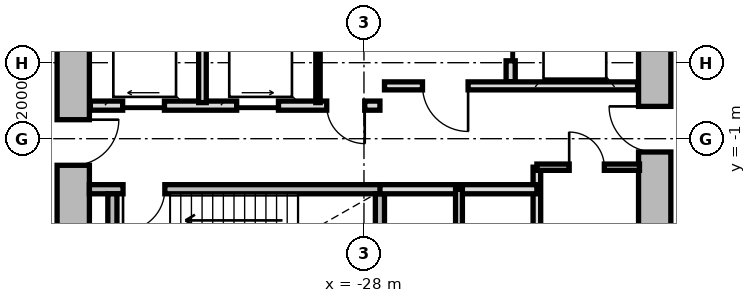
"""IFC4 building model, lengths in metres.
Left out: names, types, materials, properties, quantities, classifications, styles, units other than length and angle.
Written with IfcOpenShell. Run it as: python <this file> out.ifc"""

import sys

from ifc_helpers import new_model, si_unit, direction, frame, frame_2d, origin, place, context, subcontext, project, spatial, rectangle, extrude, source, transform, mapped, element, fill, save


model = new_model("IFC4")
c1 = context("Model", 3, precision=1e-05, world=origin(), true_north=direction((0.0, 1.0)))
c2 = subcontext(c1, "Body", "Model", "MODEL_VIEW")
j1 = project(units=[si_unit("LENGTHUNIT", "METRE"), si_unit("PLANEANGLEUNIT", "RADIAN")], contexts=[c1])
p1 = place(None, origin())
s1 = spatial("IfcSite", under=j1, at=p1, CompositionType="ELEMENT")
p2 = place(p1, origin())
s2 = spatial("IfcBuilding", under=s1, at=p2, CompositionType="ELEMENT")
p3 = place(p2, frame((0.0, 0.0, 73.45)))
s3 = spatial("IfcBuildingStorey", under=s2, at=p3, CompositionType="ELEMENT", Elevation=73.45)
m1 = source(origin(), c2, "Body", "SweptSolid", [
    extrude(rectangle(XDim=11.0, YDim=0.85, at=frame_2d((5.5, 0.0))), origin(), (0.0, 0.0, 1.0), 4.08),
])
p4 = place(p3, frame((-35.65, -5.5, 0.0), z_axis=(0.0, 0.0, 1.0), x_axis=(0.0, 1.0, 0.0)))
e1 = element("IfcWall", 1, at=p4, inside=s3, PredefinedType="SHEAR", context=c2, shape_type="MappedRepresentation", body=[
    mapped(m1, transform((0.0, 0.0, 0.0), x_axis=(1.0, 0.0, 0.0), y_axis=(0.0, 1.0, 0.0), z_axis=(0.0, 0.0, 1.0), scale=1.0)),
])
p5 = place(p4, frame((3.8, 0.0, 0.0)))
e2 = element("IfcOpeningElement", 2, at=p5, cuts=e1, PredefinedType="OPENING", context=c2, shape_type="SweptSolid", body=[
    extrude(rectangle(XDim=1.2, YDim=2.15, at=frame_2d((0.6, 1.075))), frame((0.0, 0.435, 0.0), z_axis=(0.0, -1.0, 0.0), x_axis=(1.0, 0.0, 0.0)), (0.0, 0.0, 1.0), 0.87),
])
p6 = place(p3, frame((-20.35, 5.5, 0.0), z_axis=(0.0, 0.0, 1.0), x_axis=(0.0, -1.0, 0.0)))
e3 = element("IfcWall", 3, at=p6, inside=s3, PredefinedType="SHEAR", context=c2, shape_type="MappedRepresentation", body=[
    mapped(m1, transform((0.0, 0.0, 0.0), x_axis=(1.0, 0.0, 0.0), y_axis=(0.0, 1.0, 0.0), z_axis=(0.0, 0.0, 1.0), scale=1.0)),
])
p7 = place(p6, frame((5.65, 0.0, 0.0)))
e4 = element("IfcOpeningElement", 4, at=p7, cuts=e3, PredefinedType="OPENING", context=c2, shape_type="SweptSolid", body=[
    extrude(rectangle(XDim=1.2, YDim=2.15, at=frame_2d((0.6, 1.075))), frame((0.0, 0.435, 0.0), z_axis=(0.0, -1.0, 0.0), x_axis=(1.0, 0.0, 0.0)), (0.0, 0.0, 1.0), 0.87),
])
p8 = place(p6, frame((9.3, 0.0, 0.0)))
e5 = element("IfcOpeningElement", 5, at=p8, cuts=e3, PredefinedType="OPENING", context=c2, shape_type="SweptSolid", body=[
    extrude(rectangle(XDim=1.0, YDim=2.1, at=frame_2d((0.5, 1.05))), frame((0.0, 0.435, 0.0), z_axis=(0.0, -1.0, 0.0), x_axis=(1.0, 0.0, 0.0)), (0.0, 0.0, 1.0), 0.87),
])
m2 = source(origin(), c2, "Body", "SweptSolid", [
    extrude(rectangle(XDim=7.765, YDim=0.24, at=frame_2d((3.883, 0.0))), origin(), (0.0, 0.0, 1.0), 4.08),
])
p9 = place(p3, frame((-35.225, -2.33, 0.0), z_axis=(0.0, 0.0, 1.0), x_axis=(1.0, 0.0, 0.0)))
e6 = element("IfcWall", 6, at=p9, inside=s3, PredefinedType="PARTITIONING", context=c2, shape_type="MappedRepresentation", body=[
    mapped(m2, transform((0.0, 0.0, 0.0), x_axis=(1.0, 0.0, 0.0), y_axis=(0.0, 1.0, 0.0), z_axis=(0.0, 0.0, 1.0), scale=1.0)),
])
p10 = place(p9, frame((0.885, 0.0, 0.0)))
e7 = element("IfcOpeningElement", 7, at=p10, cuts=e6, PredefinedType="OPENING", context=c2, shape_type="SweptSolid", body=[
    extrude(rectangle(XDim=1.1, YDim=2.15, at=frame_2d((0.55, 1.075))), frame((0.0, 0.13, 0.0), z_axis=(0.0, -1.0, 0.0), x_axis=(1.0, 0.0, 0.0)), (0.0, 0.0, 1.0), 0.26),
])
m3 = source(origin(), c2, "Body", "SweptSolid", [
    extrude(rectangle(XDim=3.075, YDim=0.24, at=frame_2d((1.538, 0.0))), origin(), (0.0, 0.0, 1.0), 4.08),
])
for number, where, z_axis, x_axis in (
    (8, (-34.62, -5.525, 0.0), (0.0, 0.0, 1.0), (0.0, 1.0, 0.0)),
    (9, (-27.58, -5.525, 0.0), (0.0, 0.0, 1.0), (0.0, 1.0, 0.0)),
):
    element("IfcWall", number, at=place(p3, frame(where, z_axis=z_axis, x_axis=x_axis)), inside=s3, PredefinedType="PARTITIONING", context=c2, shape_type="MappedRepresentation", body=[
        mapped(m3, transform((0.0, 0.0, 0.0), x_axis=(1.0, 0.0, 0.0), y_axis=(0.0, 1.0, 0.0), z_axis=(0.0, 0.0, 1.0), scale=1.0)),
    ])
m4 = source(origin(), c2, "Body", "SweptSolid", [
    extrude(rectangle(XDim=5.0, YDim=0.24, at=frame_2d((2.5, 0.0))), origin(), (0.0, 0.0, 1.0), 4.065),
])
p11 = place(p3, frame((-24.14, 0.5, 0.0), z_axis=(0.0, 0.0, 1.0), x_axis=(0.0, 1.0, 0.0)))
e10 = element("IfcWall", 10, at=p11, inside=s3, PredefinedType="PARTITIONING", context=c2, shape_type="MappedRepresentation", body=[
    mapped(m4, transform((0.0, 0.0, 0.0), x_axis=(1.0, 0.0, 0.0), y_axis=(0.0, 1.0, 0.0), z_axis=(0.0, 0.0, 1.0), scale=1.0)),
])
p12 = place(p11, frame((3.05, 0.0, 0.0)))
e11 = element("IfcOpeningElement", 11, at=p12, cuts=e10, PredefinedType="OPENING", context=c2, shape_type="SweptSolid", body=[
    extrude(rectangle(XDim=1.3, YDim=2.2, at=frame_2d((0.65, 1.1))), frame((0.0, 0.13, 0.0), z_axis=(0.0, -1.0, 0.0), x_axis=(1.0, 0.0, 0.0)), (0.0, 0.0, 1.0), 0.26),
])
p13 = place(p11, frame((0.55, 0.0, 0.0)))
e12 = element("IfcOpeningElement", 12, at=p13, cuts=e10, PredefinedType="OPENING", context=c2, shape_type="SweptSolid", body=[
    extrude(rectangle(XDim=1.3, YDim=2.2, at=frame_2d((0.65, 1.1))), frame((0.0, 0.13, 0.0), z_axis=(0.0, -1.0, 0.0), x_axis=(1.0, 0.0, 0.0)), (0.0, 0.0, 1.0), 0.26),
])
m5 = source(origin(), c2, "Body", "SweptSolid", [
    extrude(rectangle(XDim=6.66, YDim=0.21, at=frame_2d((3.33, 0.0))), origin(), (0.0, 0.0, 1.0), 4.065),
])
p14 = place(p3, frame((-27.46, 0.39, 0.0), z_axis=(0.0, 0.0, 1.0), x_axis=(1.0, 0.0, 0.0)))
e13 = element("IfcWall", 13, at=p14, inside=s3, PredefinedType="PARTITIONING", context=c2, shape_type="MappedRepresentation", body=[
    mapped(m5, transform((0.0, 0.0, 0.0), x_axis=(1.0, 0.0, 0.0), y_axis=(0.0, 1.0, 0.0), z_axis=(0.0, 0.0, 1.0), scale=1.0)),
])
p15 = place(p14, frame((1.0, 0.0, 0.0)))
e14 = element("IfcOpeningElement", 14, at=p15, cuts=e13, PredefinedType="OPENING", context=c2, shape_type="SweptSolid", body=[
    extrude(rectangle(XDim=1.2, YDim=2.15, at=frame_2d((0.6, 1.075))), frame((0.0, 0.115, 0.0), z_axis=(0.0, -1.0, 0.0), x_axis=(1.0, 0.0, 0.0)), (0.0, 0.0, 1.0), 0.23),
])
m6 = source(origin(), c2, "Body", "SweptSolid", [
    extrude(rectangle(XDim=7.62, YDim=0.24, at=frame_2d((3.81, 0.0))), origin(), (0.0, 0.0, 1.0), 4.065),
])
p16 = place(p3, frame((-35.2, -0.13, 0.0), z_axis=(0.0, 0.0, 1.0), x_axis=(1.0, 0.0, 0.0)))
e15 = element("IfcWall", 15, at=p16, inside=s3, PredefinedType="PARTITIONING", context=c2, shape_type="MappedRepresentation", body=[
    mapped(m6, transform((0.0, 0.0, 0.0), x_axis=(1.0, 0.0, 0.0), y_axis=(0.0, 1.0, 0.0), z_axis=(0.0, 0.0, 1.0), scale=1.0)),
])
p17 = place(p16, frame((6.22, 0.0, 0.0)))
e16 = element("IfcOpeningElement", 16, at=p17, cuts=e15, PredefinedType="OPENING", context=c2, shape_type="SweptSolid", body=[
    extrude(rectangle(XDim=1.0, YDim=2.1, at=frame_2d((0.5, 1.05))), frame((0.0, 0.13, 0.0), z_axis=(0.0, -1.0, 0.0), x_axis=(1.0, 0.0, 0.0)), (0.0, 0.0, 1.0), 0.26),
])
p18 = place(p16, frame((0.85, 0.0, 0.0)))
e17 = element("IfcOpeningElement", 17, at=p18, cuts=e15, PredefinedType="OPENING", context=c2, shape_type="SweptSolid", body=[
    extrude(rectangle(XDim=1.1, YDim=2.2, at=frame_2d((0.55, 1.1))), frame((0.0, 0.13, 0.0), z_axis=(0.0, -1.0, 0.0), x_axis=(1.0, 0.0, 0.0)), (0.0, 0.0, 1.0), 0.26),
])
p19 = place(p16, frame((3.85, 0.0, 0.0)))
e18 = element("IfcOpeningElement", 18, at=p19, cuts=e15, PredefinedType="OPENING", context=c2, shape_type="SweptSolid", body=[
    extrude(rectangle(XDim=1.1, YDim=2.2, at=frame_2d((0.55, 1.1))), frame((0.0, 0.13, 0.0), z_axis=(0.0, -1.0, 0.0), x_axis=(1.0, 0.0, 0.0)), (0.0, 0.0, 1.0), 0.26),
])
m7 = source(origin(), c2, "Body", "SweptSolid", [
    extrude(rectangle(XDim=2.33, YDim=0.115, at=frame_2d((1.165, 0.0))), origin(), (0.0, 0.0, 1.0), 4.065),
])
p20 = place(p3, frame((-29.21, -0.05, 0.0), z_axis=(0.0, 0.0, 1.0), x_axis=(0.0, 1.0, 0.0)))
e19 = element("IfcWall", 19, at=p20, inside=s3, PredefinedType="PARTITIONING", context=c2, shape_type="MappedRepresentation", body=[
    mapped(m7, transform((0.0, 0.0, 0.0), x_axis=(1.0, 0.0, 0.0), y_axis=(0.0, 1.0, 0.0), z_axis=(0.0, 0.0, 1.0), scale=1.0)),
])
m8 = source(origin(), c2, "Body", "SweptSolid", [
    extrude(rectangle(XDim=2.33, YDim=0.2, at=frame_2d((1.165, 0.0))), origin(), (0.0, 0.0, 1.0), 4.065),
])
p21 = place(p3, frame((-32.25, -0.05, 0.0), z_axis=(0.0, 0.0, 1.0), x_axis=(0.0, 1.0, 0.0)))
e20 = element("IfcWall", 20, at=p21, inside=s3, PredefinedType="PARTITIONING", context=c2, shape_type="MappedRepresentation", body=[
    mapped(m8, transform((0.0, 0.0, 0.0), x_axis=(1.0, 0.0, 0.0), y_axis=(0.0, 1.0, 0.0), z_axis=(0.0, 0.0, 1.0), scale=1.0)),
])
m9 = source(origin(), c2, "Body", "SweptSolid", [
    extrude(rectangle(XDim=3.8, YDim=0.2, at=frame_2d((1.9, 0.0))), origin(), (0.0, 0.0, 1.0), 4.065),
])
p22 = place(p3, frame((-23.45, -5.55, 0.0), z_axis=(0.0, 0.0, 1.0), x_axis=(0.0, 1.0, 0.0)))
e21 = element("IfcWall", 21, at=p22, inside=s3, PredefinedType="PARTITIONING", context=c2, shape_type="MappedRepresentation", body=[
    mapped(m9, transform((0.0, 0.0, 0.0), x_axis=(1.0, 0.0, 0.0), y_axis=(0.0, 1.0, 0.0), z_axis=(0.0, 0.0, 1.0), scale=1.0)),
])
m10 = source(origin(), c2, "Body", "SweptSolid", [
    extrude(rectangle(XDim=4.13, YDim=0.24, at=frame_2d((2.065, 0.0))), origin(), (0.0, 0.0, 1.0), 4.065),
])
p23 = place(p3, frame((-27.58, -2.33, 0.0), z_axis=(0.0, 0.0, 1.0), x_axis=(1.0, 0.0, 0.0)))
e22 = element("IfcWall", 22, at=p23, inside=s3, PredefinedType="PARTITIONING", context=c2, shape_type="MappedRepresentation", body=[
    mapped(m10, transform((0.0, 0.0, 0.0), x_axis=(1.0, 0.0, 0.0), y_axis=(0.0, 1.0, 0.0), z_axis=(0.0, 0.0, 1.0), scale=1.0)),
])
m11 = source(origin(), c2, "Body", "SweptSolid", [
    extrude(rectangle(XDim=3.22, YDim=0.18, at=frame_2d((1.61, 0.0))), origin(), (0.0, 0.0, 1.0), 4.065),
])
p24 = place(p3, frame((-25.5, -5.55, 0.0), z_axis=(0.0, 0.0, 1.0), x_axis=(0.0, 1.0, 0.0)))
e23 = element("IfcWall", 23, at=p24, inside=s3, PredefinedType="PARTITIONING", context=c2, shape_type="MappedRepresentation", body=[
    mapped(m11, transform((0.0, 0.0, 0.0), x_axis=(1.0, 0.0, 0.0), y_axis=(0.0, 1.0, 0.0), z_axis=(0.0, 0.0, 1.0), scale=1.0)),
])
m12 = source(origin(), c2, "Body", "SweptSolid", [
    extrude(rectangle(XDim=2.7, YDim=0.165, at=frame_2d((1.35, 0.0))), origin(), (0.0, 0.0, 1.0), 4.065),
])
p25 = place(p3, frame((-23.45, -1.75, 0.0), z_axis=(0.0, 0.0, 1.0), x_axis=(1.0, 0.0, 0.0)))
e24 = element("IfcWall", 24, at=p25, inside=s3, PredefinedType="PARTITIONING", context=c2, shape_type="MappedRepresentation", body=[
    mapped(m12, transform((0.0, 0.0, 0.0), x_axis=(1.0, 0.0, 0.0), y_axis=(0.0, 1.0, 0.0), z_axis=(0.0, 0.0, 1.0), scale=1.0)),
])
p26 = place(p25, frame((0.85, 0.0, 0.0)))
e25 = element("IfcOpeningElement", 25, at=p26, cuts=e24, PredefinedType="OPENING", context=c2, shape_type="SweptSolid", body=[
    extrude(rectangle(XDim=0.925, YDim=2.1, at=frame_2d((0.462, 1.05))), frame((0.0, 0.093, 0.0), z_axis=(0.0, -1.0, 0.0), x_axis=(1.0, 0.0, 0.0)), (0.0, 0.0, 1.0), 0.185),
])
m13 = source(origin(), c2, "Body", "SweptSolid", [
    extrude(rectangle(XDim=1.1, YDim=2.15, at=frame_2d((0.55, 1.075))), frame((0.0, 0.025, 0.0), z_axis=(0.0, -1.0, 0.0), x_axis=(1.0, 0.0, 0.0)), (0.0, 0.0, 1.0), 0.05),
])
p27 = place(p10, frame((1.1, 0.0, 0.0), z_axis=(0.0, 0.0, 1.0), x_axis=(-1.0, 0.0, 0.0)))
e26 = element("IfcDoor", 26, at=p27, inside=s3, OperationType="SINGLE_SWING_RIGHT", PredefinedType="DOOR", context=c2, shape_type="MappedRepresentation", body=[
    mapped(m13, transform((0.0, 0.0, 0.0), x_axis=(1.0, 0.0, 0.0), y_axis=(0.0, 1.0, 0.0), z_axis=(0.0, 0.0, 1.0), scale=1.0)),
])
fill(e7, e26)
m14 = source(origin(), c2, "Body", "SweptSolid", [
    extrude(rectangle(XDim=1.3, YDim=2.2, at=frame_2d((0.65, 1.1))), frame((0.0, 0.025, 0.0), z_axis=(0.0, -1.0, 0.0), x_axis=(1.0, 0.0, 0.0)), (0.0, 0.0, 1.0), 0.05),
])
p28 = place(p13, origin())
e27 = element("IfcDoor", 27, at=p28, inside=s3, OperationType="SLIDING_TO_RIGHT", PredefinedType="DOOR", context=c2, shape_type="MappedRepresentation", body=[
    mapped(m14, transform((0.0, 0.0, 0.0), x_axis=(1.0, 0.0, 0.0), y_axis=(0.0, 1.0, 0.0), z_axis=(0.0, 0.0, 1.0), scale=1.0)),
])
fill(e12, e27)
m15 = source(origin(), c2, "Body", "SweptSolid", [
    extrude(rectangle(XDim=1.2, YDim=2.15, at=frame_2d((0.6, 1.075))), frame((0.0, 0.025, 0.0), z_axis=(0.0, -1.0, 0.0), x_axis=(1.0, 0.0, 0.0)), (0.0, 0.0, 1.0), 0.05),
])
p29 = place(p15, frame((1.2, 0.0, 0.0), z_axis=(0.0, 0.0, 1.0), x_axis=(-1.0, 0.0, 0.0)))
e28 = element("IfcDoor", 28, at=p29, inside=s3, OperationType="SINGLE_SWING_LEFT", PredefinedType="DOOR", context=c2, shape_type="MappedRepresentation", body=[
    mapped(m15, transform((0.0, 0.0, 0.0), x_axis=(1.0, 0.0, 0.0), y_axis=(0.0, 1.0, 0.0), z_axis=(0.0, 0.0, 1.0), scale=1.0)),
])
fill(e14, e28)
p30 = place(p5, frame((1.2, 0.0, 0.0), z_axis=(0.0, 0.0, 1.0), x_axis=(-1.0, 0.0, 0.0)))
e29 = element("IfcDoor", 29, at=p30, inside=s3, OperationType="SINGLE_SWING_LEFT", PredefinedType="DOOR", context=c2, shape_type="MappedRepresentation", body=[
    mapped(m15, transform((0.0, 0.0, 0.0), x_axis=(1.0, 0.0, 0.0), y_axis=(0.0, 1.0, 0.0), z_axis=(0.0, 0.0, 1.0), scale=1.0)),
])
fill(e2, e29)
p31 = place(p7, frame((1.2, 0.0, 0.0), z_axis=(0.0, 0.0, 1.0), x_axis=(-1.0, 0.0, 0.0)))
e30 = element("IfcDoor", 30, at=p31, inside=s3, OperationType="SINGLE_SWING_RIGHT", PredefinedType="DOOR", context=c2, shape_type="MappedRepresentation", body=[
    mapped(m15, transform((0.0, 0.0, 0.0), x_axis=(1.0, 0.0, 0.0), y_axis=(0.0, 1.0, 0.0), z_axis=(0.0, 0.0, 1.0), scale=1.0)),
])
fill(e4, e30)
m16 = source(origin(), c2, "Body", "SweptSolid", [
    extrude(rectangle(XDim=1.0, YDim=2.1, at=frame_2d((0.5, 1.05))), frame((0.0, 0.025, 0.0), z_axis=(0.0, -1.0, 0.0), x_axis=(1.0, 0.0, 0.0)), (0.0, 0.0, 1.0), 0.05),
])
p32 = place(p17, frame((1.0, 0.0, 0.0), z_axis=(0.0, 0.0, 1.0), x_axis=(-1.0, 0.0, 0.0)))
e31 = element("IfcDoor", 31, at=p32, inside=s3, OperationType="SINGLE_SWING_LEFT", PredefinedType="DOOR", context=c2, shape_type="MappedRepresentation", body=[
    mapped(m16, transform((0.0, 0.0, 0.0), x_axis=(1.0, 0.0, 0.0), y_axis=(0.0, 1.0, 0.0), z_axis=(0.0, 0.0, 1.0), scale=1.0)),
])
fill(e16, e31)
m17 = source(origin(), c2, "Body", "SweptSolid", [
    extrude(rectangle(XDim=1.1, YDim=2.2, at=frame_2d((0.55, 1.1))), frame((0.0, 0.025, 0.0), z_axis=(0.0, -1.0, 0.0), x_axis=(1.0, 0.0, 0.0)), (0.0, 0.0, 1.0), 0.05),
])
p33 = place(p18, origin())
e32 = element("IfcDoor", 32, at=p33, inside=s3, OperationType="SLIDING_TO_LEFT", PredefinedType="DOOR", context=c2, shape_type="MappedRepresentation", body=[
    mapped(m17, transform((0.0, 0.0, 0.0), x_axis=(1.0, 0.0, 0.0), y_axis=(0.0, 1.0, 0.0), z_axis=(0.0, 0.0, 1.0), scale=1.0)),
])
fill(e17, e32)
p34 = place(p19, origin())
e33 = element("IfcDoor", 33, at=p34, inside=s3, OperationType="SLIDING_TO_RIGHT", PredefinedType="DOOR", context=c2, shape_type="MappedRepresentation", body=[
    mapped(m17, transform((0.0, 0.0, 0.0), x_axis=(1.0, 0.0, 0.0), y_axis=(0.0, 1.0, 0.0), z_axis=(0.0, 0.0, 1.0), scale=1.0)),
])
fill(e18, e33)
m18 = source(origin(), c2, "Body", "SweptSolid", [
    extrude(rectangle(XDim=0.925, YDim=2.1, at=frame_2d((0.462, 1.05))), frame((0.0, 0.025, 0.0), z_axis=(0.0, -1.0, 0.0), x_axis=(1.0, 0.0, 0.0)), (0.0, 0.0, 1.0), 0.05),
])
p35 = place(p26, origin())
e34 = element("IfcDoor", 34, at=p35, inside=s3, OperationType="SINGLE_SWING_LEFT", PredefinedType="DOOR", context=c2, shape_type="MappedRepresentation", body=[
    mapped(m18, transform((0.0, 0.0, 0.0), x_axis=(1.0, 0.0, 0.0), y_axis=(0.0, 1.0, 0.0), z_axis=(0.0, 0.0, 1.0), scale=1.0)),
])
fill(e25, e34)
save(model, sys.argv[1])
